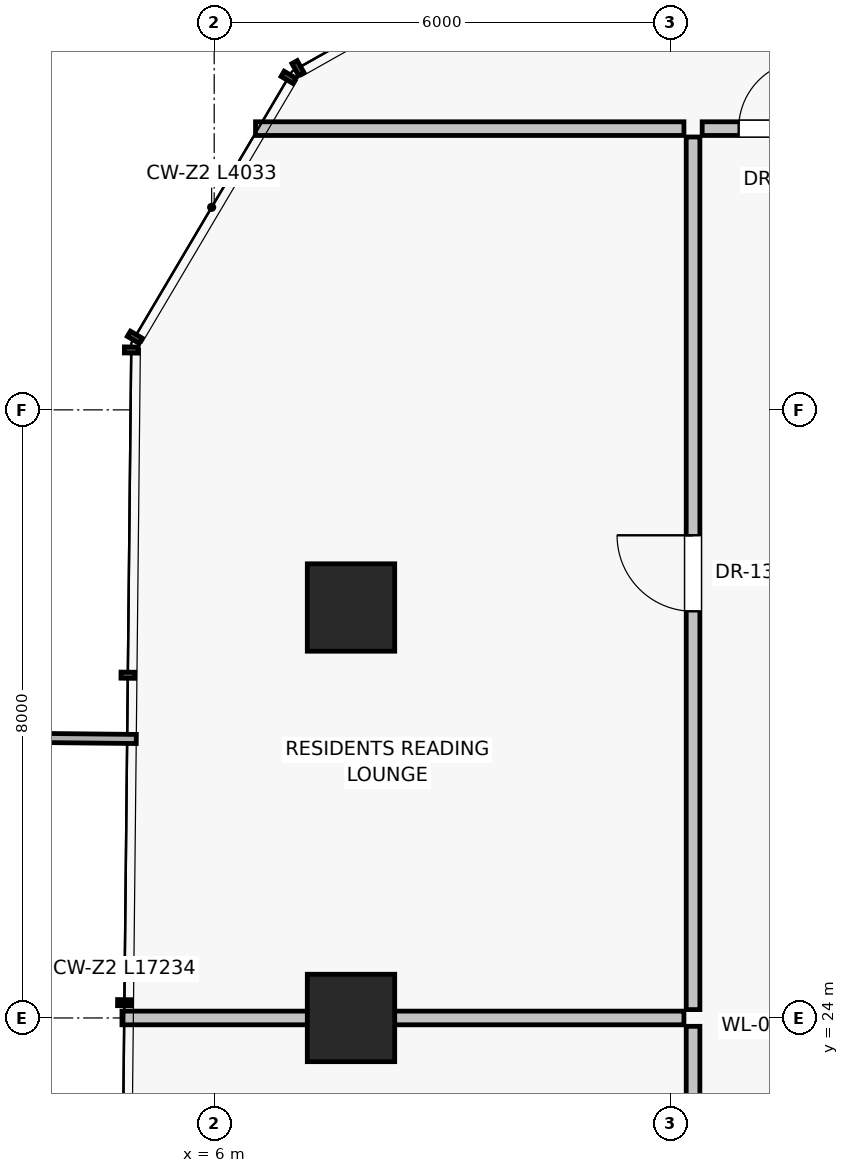
"""IFC4 building model, lengths in metres.
Left out: names, types, materials, properties, quantities, classifications, styles, units other than length and angle.
Written with IfcOpenShell. Run it as: python <this file> out.ifc"""

import sys

from ifc_helpers import new_model, si_unit, direction, frame, frame_2d, origin, origin_2d, place, context, subcontext, project, spatial, rectangle, extrude, source, transform, mapped, element, fill, save


model = new_model("IFC4")
c1 = context("Model", 3, precision=1e-05, world=origin(), true_north=direction((0.0, 1.0)))
c2 = subcontext(c1, "Body", "Model", "MODEL_VIEW")
j1 = project(units=[si_unit("LENGTHUNIT", "METRE"), si_unit("PLANEANGLEUNIT", "RADIAN")], contexts=[c1])
p1 = place(None, origin())
s1 = spatial("IfcSite", under=j1, at=p1, CompositionType="ELEMENT")
p2 = place(p1, origin())
s2 = spatial("IfcBuilding", under=s1, at=p2, CompositionType="ELEMENT")
p3 = place(p2, frame((0.0, 0.0, 126.25)))
s3 = spatial("IfcBuildingStorey", under=s2, at=p3, CompositionType="ELEMENT", Elevation=126.25)
for number, where, z_axis, x_axis in (
    (1, (7.8, 29.4, 0.0), (0.0, 0.0, 1.0), (1.0, 0.0, 0.0)),
    (2, (7.8, 24.0, 0.0), (0.0, 0.0, 1.0), (1.0, 0.0, 0.0)),
):
    element("IfcColumn", number, at=place(p3, frame(where, z_axis=z_axis, x_axis=x_axis)), inside=s3, PredefinedType="COLUMN", context=c2, shape_type="SweptSolid", body=[
        extrude(rectangle(XDim=1.15, YDim=1.15, at=origin_2d()), origin(), (0.0, 0.0, 1.0), 3.25),
    ])
p4 = place(p3, frame((12.18, 35.7, 0.0), z_axis=(0.0, 0.0, 1.0), x_axis=(-1.0, 0.0, 0.0)))
e3 = element("IfcWall", 3, at=p4, inside=s3, PredefinedType="PARTITIONING", context=c2, shape_type="SweptSolid", body=[
    extrude(rectangle(XDim=5.636, YDim=0.18, at=frame_2d((2.818, 0.0))), origin(), (0.0, 0.0, 1.0), 3.0),
])
p5 = place(p3, frame((12.3, 17.06, 0.0), z_axis=(0.0, 0.0, 1.0), x_axis=(0.0, 1.0, 0.0)))
e4 = element("IfcWall", 4, at=p5, inside=s3, PredefinedType="PARTITIONING", context=c2, shape_type="SweptSolid", body=[
    extrude(rectangle(XDim=6.83, YDim=0.18, at=frame_2d((3.415, 0.0))), origin(), (0.0, 0.0, 1.0), 2.58),
])
p6 = place(p5, frame((2.915, 0.0, 0.0)))
e5 = element("IfcOpeningElement", 5, at=p6, cuts=e4, PredefinedType="OPENING", context=c2, shape_type="SweptSolid", body=[
    extrude(rectangle(XDim=1.0, YDim=2.01, at=frame_2d((0.5, 1.005))), frame((0.0, 0.1, 0.0), z_axis=(0.0, -1.0, 0.0), x_axis=(1.0, 0.0, 0.0)), (0.0, 0.0, 1.0), 0.2),
])
p7 = place(p3, frame((12.3, 24.11, 0.0), z_axis=(0.0, 0.0, 1.0), x_axis=(0.0, 1.0, 0.0)))
e6 = element("IfcWall", 6, at=p7, inside=s3, PredefinedType="PARTITIONING", context=c2, shape_type="SweptSolid", body=[
    extrude(rectangle(XDim=11.48, YDim=0.18, at=frame_2d((5.74, 0.0))), origin(), (0.0, 0.0, 1.0), 2.58),
])
p8 = place(p7, frame((5.24, 0.0, 0.0)))
e7 = element("IfcOpeningElement", 7, at=p8, cuts=e6, PredefinedType="OPENING", context=c2, shape_type="SweptSolid", body=[
    extrude(rectangle(XDim=1.0, YDim=2.01, at=frame_2d((0.5, 1.005))), frame((0.0, 0.1, 0.0), z_axis=(0.0, -1.0, 0.0), x_axis=(1.0, 0.0, 0.0)), (0.0, 0.0, 1.0), 0.2),
])
p9 = place(p3, frame((12.18, 24.0, 0.0), z_axis=(0.0, 0.0, 1.0), x_axis=(-1.0, 0.0, 0.0)))
e8 = element("IfcWall", 8, at=p9, inside=s3, PredefinedType="PARTITIONING", context=c2, shape_type="SweptSolid", body=[
    extrude(rectangle(XDim=7.393, YDim=0.18, at=frame_2d((3.697, 0.0))), origin(), (0.0, 0.0, 1.0), 3.0),
])
p10 = place(p3, frame((12.42, 35.7, 0.0), z_axis=(0.0, 0.0, 1.0), x_axis=(1.0, 0.0, 0.0)))
e9 = element("IfcWall", 9, at=p10, inside=s3, PredefinedType="PARTITIONING", context=c2, shape_type="SweptSolid", body=[
    extrude(rectangle(XDim=1.86, YDim=0.18, at=frame_2d((0.93, 0.0))), origin(), (0.0, 0.0, 1.0), 3.0),
])
p11 = place(p10, frame((0.48, 0.0, 0.0)))
e10 = element("IfcOpeningElement", 10, at=p11, cuts=e9, PredefinedType="OPENING", context=c2, shape_type="SweptSolid", body=[
    extrude(rectangle(XDim=0.9, YDim=2.01, at=frame_2d((0.45, 1.005))), frame((0.0, 0.1, 0.0), z_axis=(0.0, -1.0, 0.0), x_axis=(1.0, 0.0, 0.0)), (0.0, 0.0, 1.0), 0.2),
])
m1 = source(origin(), c2, "Body", "SweptSolid", [
    extrude(rectangle(XDim=1.0, YDim=2.01, at=frame_2d((0.5, 1.005))), frame((0.0, 0.025, 0.0), z_axis=(0.0, -1.0, 0.0), x_axis=(1.0, 0.0, 0.0)), (0.0, 0.0, 1.0), 0.05),
])
p12 = place(p8, origin())
e11 = element("IfcDoor", 11, at=p12, inside=s3, OperationType="SINGLE_SWING_RIGHT", PredefinedType="DOOR", context=c2, shape_type="MappedRepresentation", body=[
    mapped(m1, transform((0.0, 0.0, 0.0), scale=1.0)),
])
fill(e7, e11)
m2 = source(origin(), c2, "Body", "SweptSolid", [
    extrude(rectangle(XDim=0.9, YDim=2.01, at=frame_2d((0.45, 1.005))), frame((0.0, 0.025, 0.0), z_axis=(0.0, -1.0, 0.0), x_axis=(1.0, 0.0, 0.0)), (0.0, 0.0, 1.0), 0.05),
])
p13 = place(p11, origin())
e12 = element("IfcDoor", 12, at=p13, inside=s3, OperationType="SINGLE_SWING_RIGHT", PredefinedType="DOOR", context=c2, shape_type="MappedRepresentation", body=[
    mapped(m2, transform((0.0, 0.0, 0.0), scale=1.0)),
])
fill(e10, e12)
save(model, sys.argv[1])
